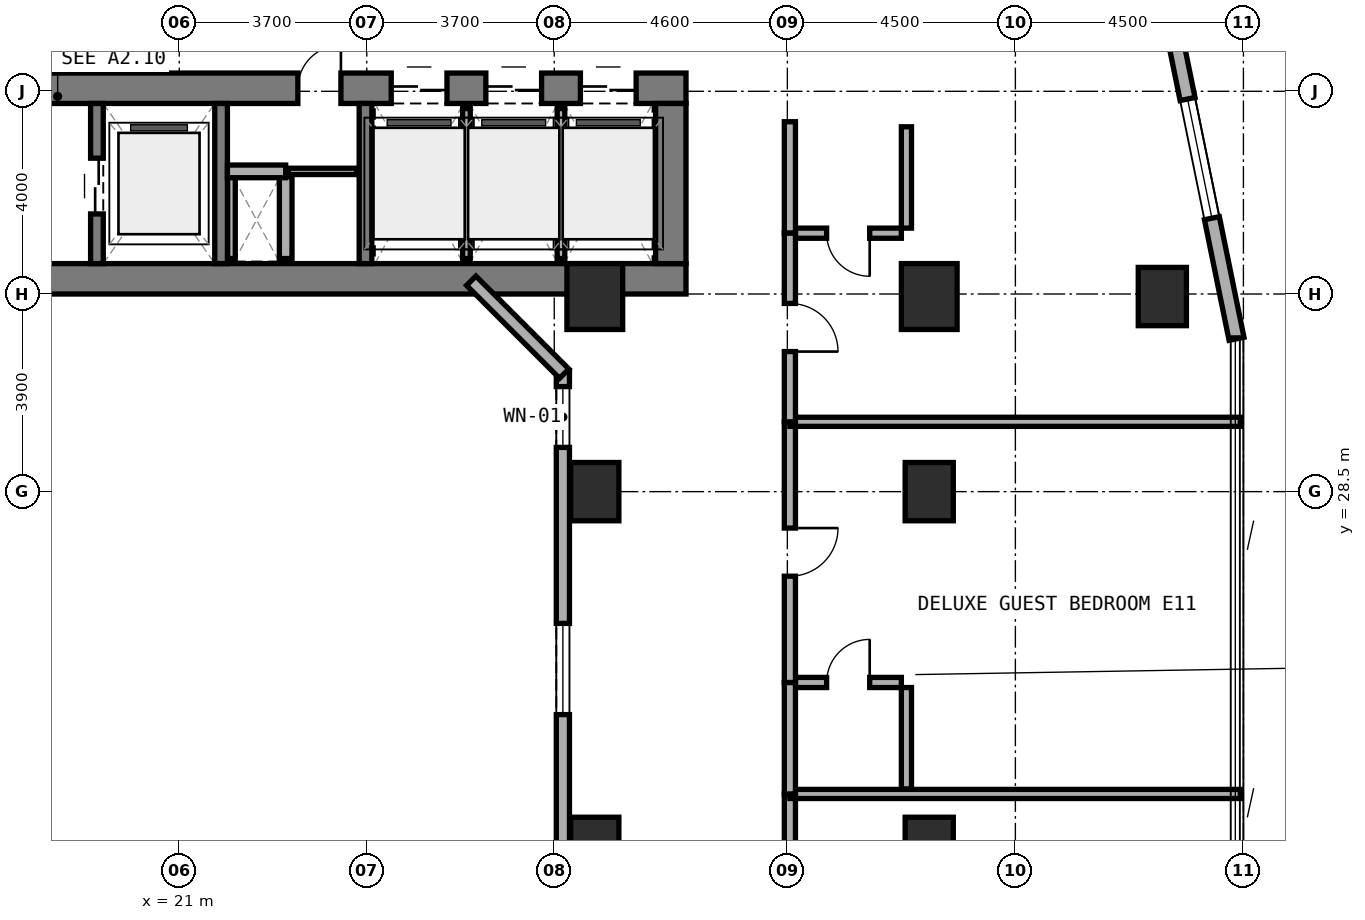
"""IFC4 building model, lengths in metres.
Left out: names, types, materials, properties, quantities, classifications, styles, units other than length and angle.
Written with IfcOpenShell. Run it as: python <this file> out.ifc"""

import sys

from ifc_helpers import new_model, si_unit, direction, frame, frame_2d, origin, origin_2d, place, context, subcontext, project, spatial, rectangle, extrude, element, fill, save


model = new_model("IFC4")
c1 = context("Model", 3, precision=1e-05, world=origin(), true_north=direction((0.0, 1.0)))
c2 = subcontext(c1, "Body", "Model", "MODEL_VIEW")
j1 = project(units=[si_unit("LENGTHUNIT", "METRE"), si_unit("PLANEANGLEUNIT", "RADIAN")], contexts=[c1])
p1 = place(None, origin())
s1 = spatial("IfcSite", under=j1, at=p1, CompositionType="ELEMENT")
p2 = place(p1, origin())
s2 = spatial("IfcBuilding", under=s1, at=p2, CompositionType="ELEMENT")
p3 = place(p2, frame((0.0, 0.0, 31.0)))
s3 = spatial("IfcBuildingStorey", under=s2, at=p3, CompositionType="ELEMENT", Elevation=31.0)
p4 = place(p3, frame((6.2, 32.7, 0.0), z_axis=(0.0, 0.0, 1.0), x_axis=(1.0, 0.0, 0.0)))
e1 = element("IfcWall", 1, at=p4, inside=s3, PredefinedType="SHEAR", context=c2, shape_type="SweptSolid", body=[
    extrude(rectangle(XDim=24.8, YDim=0.6, at=frame_2d((12.4, 0.0))), origin(), (0.0, 0.0, 1.0), 3.5),
])
p5 = place(p4, frame((6.25, 0.0, 0.0)))
e2 = element("IfcOpeningElement", 2, at=p5, cuts=e1, PredefinedType="OPENING", context=c2, shape_type="SweptSolid", body=[
    extrude(rectangle(XDim=1.1, YDim=2.15, at=frame_2d((0.55, 1.075))), frame((0.0, 0.31, 0.0), z_axis=(0.0, -1.0, 0.0), x_axis=(1.0, 0.0, 0.0)), (0.0, 0.0, 1.0), 0.62),
])
p6 = place(p3, frame((6.2, 36.46, 0.0), z_axis=(0.0, 0.0, 1.0), x_axis=(1.0, 0.0, 0.0)))
e3 = element("IfcWall", 3, at=p6, inside=s3, PredefinedType="SHEAR", context=c2, shape_type="SweptSolid", body=[
    extrude(rectangle(XDim=24.8, YDim=0.6, at=frame_2d((12.4, 0.0))), origin(), (0.0, 0.0, 1.0), 3.5),
])
p7 = place(p6, frame((9.35, 0.0, 0.0)))
e4 = element("IfcOpeningElement", 4, at=p7, cuts=e3, PredefinedType="OPENING", context=c2, shape_type="SweptSolid", body=[
    extrude(rectangle(XDim=1.2, YDim=2.15, at=frame_2d((0.6, 1.075))), frame((0.0, 0.31, 0.0), z_axis=(0.0, -1.0, 0.0), x_axis=(1.0, 0.0, 0.0)), (0.0, 0.0, 1.0), 0.62),
])
p8 = place(p6, frame((17.14, 0.0, 0.0)))
e5 = element("IfcOpeningElement", 5, at=p8, cuts=e3, PredefinedType="OPENING", context=c2, shape_type="SweptSolid", body=[
    extrude(rectangle(XDim=0.85, YDim=2.1, at=frame_2d((0.425, 1.05))), frame((0.0, 0.31, 0.0), z_axis=(0.0, -1.0, 0.0), x_axis=(1.0, 0.0, 0.0)), (0.0, 0.0, 1.0), 0.62),
])
p9 = place(p6, frame((18.983, 0.0, 0.0)))
e6 = element("IfcOpeningElement", 6, at=p9, cuts=e3, PredefinedType="OPENING", context=c2, shape_type="SweptSolid", body=[
    extrude(rectangle(XDim=1.1, YDim=2.15, at=frame_2d((0.55, 1.075))), frame((0.0, 0.31, 0.0), z_axis=(0.0, -1.0, 0.0), x_axis=(1.0, 0.0, 0.0)), (0.0, 0.0, 1.0), 0.62),
])
p10 = place(p6, frame((20.85, 0.0, 0.0)))
e7 = element("IfcOpeningElement", 7, at=p10, cuts=e3, PredefinedType="OPENING", context=c2, shape_type="SweptSolid", body=[
    extrude(rectangle(XDim=1.1, YDim=2.15, at=frame_2d((0.55, 1.075))), frame((0.0, 0.31, 0.0), z_axis=(0.0, -1.0, 0.0), x_axis=(1.0, 0.0, 0.0)), (0.0, 0.0, 1.0), 0.62),
])
p11 = place(p6, frame((22.716, 0.0, 0.0)))
e8 = element("IfcOpeningElement", 8, at=p11, cuts=e3, PredefinedType="OPENING", context=c2, shape_type="SweptSolid", body=[
    extrude(rectangle(XDim=1.1, YDim=2.15, at=frame_2d((0.55, 1.075))), frame((0.0, 0.31, 0.0), z_axis=(0.0, -1.0, 0.0), x_axis=(1.0, 0.0, 0.0)), (0.0, 0.0, 1.0), 0.62),
])
p12 = place(p3, frame((30.7, 33.0, 0.0), z_axis=(0.0, 0.0, 1.0), x_axis=(0.0, 1.0, 0.0)))
e9 = element("IfcWall", 9, at=p12, inside=s3, PredefinedType="SHEAR", context=c2, shape_type="SweptSolid", body=[
    extrude(rectangle(XDim=3.16, YDim=0.6, at=frame_2d((1.58, 0.0))), origin(), (0.0, 0.0, 1.0), 3.5),
])
p13 = place(p3, frame((19.375, 33.0, 0.0), z_axis=(0.0, 0.0, 1.0), x_axis=(0.0, 1.0, 0.0)))
e10 = element("IfcWall", 10, at=p13, inside=s3, PredefinedType="STANDARD", context=c2, shape_type="SweptSolid", body=[
    extrude(rectangle(XDim=3.16, YDim=0.25, at=frame_2d((1.58, 0.0))), origin(), (0.0, 0.0, 1.0), 3.22),
])
p14 = place(p13, frame((0.98, 0.0, 0.0)))
e11 = element("IfcOpeningElement", 11, at=p14, cuts=e10, PredefinedType="OPENING", context=c2, shape_type="SweptSolid", body=[
    extrude(rectangle(XDim=1.1, YDim=2.15, at=frame_2d((0.55, 1.075))), frame((0.0, 0.135, 0.0), z_axis=(0.0, -1.0, 0.0), x_axis=(1.0, 0.0, 0.0)), (0.0, 0.0, 1.0), 0.27),
])
for number, where, z_axis, x_axis in (
    (12, (21.825, 33.0, 0.0), (0.0, 0.0, 1.0), (0.0, 1.0, 0.0)),
    (13, (24.675, 33.0, 0.0), (0.0, 0.0, 1.0), (0.0, 1.0, 0.0)),
):
    element("IfcWall", number, at=place(p3, frame(where, z_axis=z_axis, x_axis=x_axis)), inside=s3, PredefinedType="STANDARD", context=c2, shape_type="SweptSolid", body=[
        extrude(rectangle(XDim=3.16, YDim=0.25, at=frame_2d((1.58, 0.0))), origin(), (0.0, 0.0, 1.0), 3.22),
    ])
for number, where, z_axis, x_axis in (
    (14, (35.8, 21.5, 0.0), (0.0, 0.0, 1.0), (1.0, 0.0, 0.0)),
    (15, (35.8, 28.5, 0.0), (0.0, 0.0, 1.0), (1.0, 0.0, 0.0)),
):
    element("IfcColumn", number, at=place(p3, frame(where, z_axis=z_axis, x_axis=x_axis)), inside=s3, PredefinedType="COLUMN", context=c2, shape_type="SweptSolid", body=[
        extrude(rectangle(XDim=0.95, YDim=1.15, at=origin_2d()), origin(), (0.0, 0.0, 1.0), 3.5),
    ])
for number, where, z_axis, x_axis in (
    (16, (35.8, 32.35, 0.0), (0.0, 0.0, 1.0), (1.0, 0.0, 0.0)),
    (17, (29.2, 32.35, 0.0), (0.0, 0.0, 1.0), (1.0, 0.0, 0.0)),
):
    element("IfcColumn", number, at=place(p3, frame(where, z_axis=z_axis, x_axis=x_axis)), inside=s3, PredefinedType="COLUMN", context=c2, shape_type="SweptSolid", body=[
        extrude(rectangle(XDim=1.1, YDim=1.3, at=origin_2d()), origin(), (0.0, 0.0, 1.0), 3.5),
    ])
for number, where, z_axis, x_axis in (
    (18, (29.2, 21.5, 0.0), (0.0, 0.0, 1.0), (1.0, 0.0, 0.0)),
    (19, (29.2, 28.5, 0.0), (0.0, 0.0, 1.0), (1.0, 0.0, 0.0)),
    (20, (40.4, 32.35, 0.0), (0.0, 0.0, 1.0), (1.0, 0.0, 0.0)),
):
    element("IfcColumn", number, at=place(p3, frame(where, z_axis=z_axis, x_axis=x_axis)), inside=s3, PredefinedType="COLUMN", context=c2, shape_type="SweptSolid", body=[
        extrude(rectangle(XDim=0.95, YDim=1.15, at=origin_2d()), origin(), (0.0, 0.0, 1.0), 3.5),
    ])
p15 = place(p3, frame((41.864, 31.516, 0.0), z_axis=(0.0, 0.0, 1.0), x_axis=(-0.199990901713, 0.979797754249, 0.0)))
e21 = element("IfcWall", 21, at=p15, inside=s3, PredefinedType="STANDARD", context=c2, shape_type="SweptSolid", body=[
    extrude(rectangle(XDim=10.065, YDim=0.3, at=frame_2d((5.033, 0.0))), origin(), (0.0, 0.0, 1.0), 3.22),
])
p16 = place(p15, frame((2.429, 0.0, 0.8)))
e22 = element("IfcOpeningElement", 22, at=p16, cuts=e21, PredefinedType="OPENING", context=c2, shape_type="SweptSolid", body=[
    extrude(rectangle(XDim=2.4, YDim=1.6, at=frame_2d((1.2, 0.8))), frame((0.0, 0.16, 0.0), z_axis=(0.0, -1.0, 0.0), x_axis=(1.0, 0.0, 0.0)), (0.0, 0.0, 1.0), 0.32),
])
p17 = place(p15, frame((7.887, 0.0, 0.85)))
e23 = element("IfcOpeningElement", 23, at=p17, cuts=e21, PredefinedType="OPENING", context=c2, shape_type="SweptSolid", body=[
    extrude(rectangle(XDim=1.8, YDim=1.5, at=frame_2d((0.9, 0.75))), frame((0.0, 0.16, 0.0), z_axis=(0.0, -1.0, 0.0), x_axis=(1.0, 0.0, 0.0)), (0.0, 0.0, 1.0), 0.32),
])
p18 = place(p3, frame((28.57, 19.11, 0.0), z_axis=(0.0, 0.0, 1.0), x_axis=(0.0, 1.0, 0.0)))
e24 = element("IfcWall", 24, at=p18, inside=s3, PredefinedType="STANDARD", context=c2, shape_type="SweptSolid", body=[
    extrude(rectangle(XDim=11.78, YDim=0.26, at=frame_2d((5.89, 0.0))), origin(), (0.0, 0.0, 1.0), 3.22),
])
p19 = place(p18, frame((0.318, 0.0, 0.85)))
e25 = element("IfcOpeningElement", 25, at=p19, cuts=e24, PredefinedType="OPENING", context=c2, shape_type="SweptSolid", body=[
    extrude(rectangle(XDim=1.2, YDim=1.5, at=frame_2d((0.6, 0.75))), frame((0.0, 0.14, 0.0), z_axis=(0.0, -1.0, 0.0), x_axis=(1.0, 0.0, 0.0)), (0.0, 0.0, 1.0), 0.28),
])
p20 = place(p18, frame((4.99, 0.0, 0.85)))
e26 = element("IfcOpeningElement", 26, at=p20, cuts=e24, PredefinedType="OPENING", context=c2, shape_type="SweptSolid", body=[
    extrude(rectangle(XDim=1.8, YDim=1.5, at=frame_2d((0.9, 0.75))), frame((0.0, 0.14, 0.0), z_axis=(0.0, -1.0, 0.0), x_axis=(1.0, 0.0, 0.0)), (0.0, 0.0, 1.0), 0.28),
])
p21 = place(p18, frame((10.263, 0.0, 0.85)))
e27 = element("IfcOpeningElement", 27, at=p21, cuts=e24, PredefinedType="OPENING", context=c2, shape_type="SweptSolid", body=[
    extrude(rectangle(XDim=1.2, YDim=1.5, at=frame_2d((0.6, 0.75))), frame((0.0, 0.14, 0.0), z_axis=(0.0, -1.0, 0.0), x_axis=(1.0, 0.0, 0.0)), (0.0, 0.0, 1.0), 0.28),
])
p22 = place(p3, frame((28.596, 30.828, 0.0), z_axis=(0.0, 0.0, 1.0), x_axis=(-0.707059717605, 0.707153841636, 0.0)))
e28 = element("IfcWall", 28, at=p22, inside=s3, PredefinedType="STANDARD", context=c2, shape_type="SweptSolid", body=[
    extrude(rectangle(XDim=2.594, YDim=0.26, at=frame_2d((1.297, 0.0))), origin(), (0.0, 0.0, 1.0), 3.22),
])
p23 = place(p3, frame((22.03, 33.1, 0.0), z_axis=(0.0, 0.0, 1.0), x_axis=(0.0, 1.0, 0.0)))
e29 = element("IfcWall", 29, at=p23, inside=s3, PredefinedType="PARTITIONING", context=c2, shape_type="SweptSolid", body=[
    extrude(rectangle(XDim=1.62, YDim=0.15, at=frame_2d((0.81, 0.0))), origin(), (0.0, 0.0, 1.0), 3.22),
])
p24 = place(p3, frame((23.1, 33.1, 0.0), z_axis=(0.0, 0.0, 1.0), x_axis=(0.0, 1.0, 0.0)))
e30 = element("IfcWall", 30, at=p24, inside=s3, PredefinedType="SOLIDWALL", context=c2, shape_type="SweptSolid", body=[
    extrude(rectangle(XDim=1.62, YDim=0.25, at=frame_2d((0.81, 0.0))), origin(), (0.0, 0.0, 1.0), 3.22),
])
p25 = place(p3, frame((21.95, 34.82, 0.0), z_axis=(0.0, 0.0, 1.0), x_axis=(1.0, 0.0, 0.0)))
e31 = element("IfcWall", 31, at=p25, inside=s3, PredefinedType="SOLIDWALL", context=c2, shape_type="SweptSolid", body=[
    extrude(rectangle(XDim=1.15, YDim=0.25, at=frame_2d((0.575, 0.0))), origin(), (0.0, 0.0, 1.0), 3.22),
])
p26 = place(p3, frame((23.15, 34.82, 0.0), z_axis=(0.0, 0.0, 1.0), x_axis=(1.0, 0.0, 0.0)))
e32 = element("IfcWall", 32, at=p26, inside=s3, PredefinedType="PARTITIONING", context=c2, shape_type="SweptSolid", body=[
    extrude(rectangle(XDim=1.35, YDim=0.125, at=frame_2d((0.675, 0.0))), origin(), (0.0, 0.0, 1.0), 3.22),
])
p27 = place(p3, frame((26.667, 33.1, 0.0), z_axis=(0.0, 0.0, 1.0), x_axis=(0.0, 1.0, 0.0)))
e33 = element("IfcWall", 33, at=p27, inside=s3, PredefinedType="PARTITIONING", context=c2, shape_type="SweptSolid", body=[
    extrude(rectangle(XDim=2.96, YDim=0.15, at=frame_2d((1.48, 0.0))), origin(), (0.0, 0.0, 1.0), 3.22),
])
p28 = place(p3, frame((28.533, 33.1, 0.0), z_axis=(0.0, 0.0, 1.0), x_axis=(0.0, 1.0, 0.0)))
e34 = element("IfcWall", 34, at=p28, inside=s3, PredefinedType="PARTITIONING", context=c2, shape_type="SweptSolid", body=[
    extrude(rectangle(XDim=2.96, YDim=0.15, at=frame_2d((1.48, 0.0))), origin(), (0.0, 0.0, 1.0), 2.395),
])
p29 = place(p3, frame((33.05, 16.4, 0.0), z_axis=(0.0, 0.0, 1.0), x_axis=(0.0, 1.0, 0.0)))
e35 = element("IfcWall", 35, at=p29, inside=s3, PredefinedType="SOLIDWALL", context=c2, shape_type="SweptSolid", body=[
    extrude(rectangle(XDim=6.134, YDim=0.22, at=frame_2d((3.067, 0.0))), origin(), (0.0, 0.0, 1.0), 2.395),
])
p30 = place(p29, frame((2.592, 0.0, 0.0)))
e36 = element("IfcOpeningElement", 36, at=p30, cuts=e35, PredefinedType="OPENING", context=c2, shape_type="SweptSolid", body=[
    extrude(rectangle(XDim=0.95, YDim=2.1, at=frame_2d((0.475, 1.05))), frame((0.0, 0.12, 0.0), z_axis=(0.0, -1.0, 0.0), x_axis=(1.0, 0.0, 0.0)), (0.0, 0.0, 1.0), 0.24),
])
p31 = place(p3, frame((33.05, 22.534, 0.0), z_axis=(0.0, 0.0, 1.0), x_axis=(1.0, 0.0, 0.0)))
e37 = element("IfcWall", 37, at=p31, inside=s3, PredefinedType="SOLIDWALL", context=c2, shape_type="SweptSolid", body=[
    extrude(rectangle(XDim=8.89, YDim=0.18, at=frame_2d((4.445, 0.0))), origin(), (0.0, 0.0, 1.0), 2.745),
])
p32 = place(p3, frame((33.15, 24.734, 0.0), z_axis=(0.0, 0.0, 1.0), x_axis=(1.0, 0.0, 0.0)))
e38 = element("IfcWall", 38, at=p32, inside=s3, PredefinedType="PLUMBINGWALL", context=c2, shape_type="SweptSolid", body=[
    extrude(rectangle(XDim=2.1, YDim=0.2, at=frame_2d((1.05, 0.0))), origin(), (0.0, 0.0, 1.0), 3.22),
])
p33 = place(p32, frame((0.625, 0.0, 0.0)))
e39 = element("IfcOpeningElement", 39, at=p33, cuts=e38, PredefinedType="OPENING", context=c2, shape_type="SweptSolid", body=[
    extrude(rectangle(XDim=0.85, YDim=2.1, at=frame_2d((0.425, 1.05))), frame((0.0, 0.11, 0.0), z_axis=(0.0, -1.0, 0.0), x_axis=(1.0, 0.0, 0.0)), (0.0, 0.0, 1.0), 0.22),
])
p34 = place(p3, frame((35.35, 22.634, 0.0), z_axis=(0.0, 0.0, 1.0), x_axis=(0.0, 1.0, 0.0)))
e40 = element("IfcWall", 40, at=p34, inside=s3, PredefinedType="PLUMBINGWALL", context=c2, shape_type="SweptSolid", body=[
    extrude(rectangle(XDim=2.0, YDim=0.2, at=frame_2d((1.0, 0.0))), origin(), (0.0, 0.0, 1.0), 3.22),
])
p35 = place(p3, frame((33.05, 22.534, 0.0), z_axis=(0.0, 0.0, 1.0), x_axis=(0.0, 1.0, 0.0)))
e41 = element("IfcWall", 41, at=p35, inside=s3, PredefinedType="SOLIDWALL", context=c2, shape_type="SweptSolid", body=[
    extrude(rectangle(XDim=2.2, YDim=0.22, at=frame_2d((1.1, 0.0))), origin(), (0.0, 0.0, 1.0), 3.22),
])
p36 = place(p3, frame((33.05, 24.734, 0.0), z_axis=(0.0, 0.0, 1.0), x_axis=(0.0, 1.0, 0.0)))
e42 = element("IfcWall", 42, at=p36, inside=s3, PredefinedType="SOLIDWALL", context=c2, shape_type="SweptSolid", body=[
    extrude(rectangle(XDim=5.144, YDim=0.22, at=frame_2d((2.572, 0.0))), origin(), (0.0, 0.0, 1.0), 2.395),
])
p37 = place(p36, frame((2.097, 0.0, 0.0)))
e43 = element("IfcOpeningElement", 43, at=p37, cuts=e42, PredefinedType="OPENING", context=c2, shape_type="SweptSolid", body=[
    extrude(rectangle(XDim=0.95, YDim=2.1, at=frame_2d((0.475, 1.05))), frame((0.0, 0.12, 0.0), z_axis=(0.0, -1.0, 0.0), x_axis=(1.0, 0.0, 0.0)), (0.0, 0.0, 1.0), 0.24),
])
p38 = place(p3, frame((33.05, 29.878, 0.0), z_axis=(0.0, 0.0, 1.0), x_axis=(1.0, 0.0, 0.0)))
e44 = element("IfcWall", 44, at=p38, inside=s3, PredefinedType="SOLIDWALL", context=c2, shape_type="SweptSolid", body=[
    extrude(rectangle(XDim=8.89, YDim=0.18, at=frame_2d((4.445, 0.0))), origin(), (0.0, 0.0, 1.0), 2.745),
])
p39 = place(p3, frame((33.15, 33.6, 0.0), z_axis=(0.0, 0.0, 1.0), x_axis=(1.0, 0.0, 0.0)))
e45 = element("IfcWall", 45, at=p39, inside=s3, PredefinedType="PLUMBINGWALL", context=c2, shape_type="SweptSolid", body=[
    extrude(rectangle(XDim=2.1, YDim=0.2, at=frame_2d((1.05, 0.0))), origin(), (0.0, 0.0, 1.0), 3.22),
])
p40 = place(p39, frame((0.625, 0.0, 0.0)))
e46 = element("IfcOpeningElement", 46, at=p40, cuts=e45, PredefinedType="OPENING", context=c2, shape_type="SweptSolid", body=[
    extrude(rectangle(XDim=0.85, YDim=2.1, at=frame_2d((0.425, 1.05))), frame((0.0, 0.11, 0.0), z_axis=(0.0, -1.0, 0.0), x_axis=(1.0, 0.0, 0.0)), (0.0, 0.0, 1.0), 0.22),
])
p41 = place(p3, frame((35.35, 33.7, 0.0), z_axis=(0.0, 0.0, 1.0), x_axis=(0.0, 1.0, 0.0)))
e47 = element("IfcWall", 47, at=p41, inside=s3, PredefinedType="PLUMBINGWALL", context=c2, shape_type="SweptSolid", body=[
    extrude(rectangle(XDim=2.0, YDim=0.2, at=frame_2d((1.0, 0.0))), origin(), (0.0, 0.0, 1.0), 2.745),
])
p42 = place(p3, frame((33.05, 33.6, 0.0), z_axis=(0.0, 0.0, 1.0), x_axis=(0.0, 1.0, 0.0)))
e48 = element("IfcWall", 48, at=p42, inside=s3, PredefinedType="SOLIDWALL", context=c2, shape_type="SweptSolid", body=[
    extrude(rectangle(XDim=2.2, YDim=0.22, at=frame_2d((1.1, 0.0))), origin(), (0.0, 0.0, 1.0), 3.22),
])
p43 = place(p3, frame((33.05, 29.878, 0.0), z_axis=(0.0, 0.0, 1.0), x_axis=(0.0, 1.0, 0.0)))
e49 = element("IfcWall", 49, at=p43, inside=s3, PredefinedType="SOLIDWALL", context=c2, shape_type="SweptSolid", body=[
    extrude(rectangle(XDim=3.722, YDim=0.22, at=frame_2d((1.861, 0.0))), origin(), (0.0, 0.0, 1.0), 2.395),
])
p44 = place(p43, frame((1.386, 0.0, 0.0)))
e50 = element("IfcOpeningElement", 50, at=p44, cuts=e49, PredefinedType="OPENING", context=c2, shape_type="SweptSolid", body=[
    extrude(rectangle(XDim=0.95, YDim=2.1, at=frame_2d((0.475, 1.05))), frame((0.0, 0.12, 0.0), z_axis=(0.0, -1.0, 0.0), x_axis=(1.0, 0.0, 0.0)), (0.0, 0.0, 1.0), 0.24),
])
p45 = place(p16, origin())
e51 = element("IfcWindow", 51, at=p45, inside=s3, PartitioningType="SINGLE_PANEL", PredefinedType="WINDOW", context=c2, shape_type="SweptSolid", body=[
    extrude(rectangle(XDim=2.4, YDim=1.6, at=frame_2d((1.2, 0.8))), frame((0.0, 0.03, 0.0), z_axis=(0.0, -1.0, 0.0), x_axis=(1.0, 0.0, 0.0)), (0.0, 0.0, 1.0), 0.06),
])
fill(e22, e51)
p46 = place(p20, origin())
e52 = element("IfcWindow", 52, at=p46, inside=s3, PartitioningType="SINGLE_PANEL", PredefinedType="WINDOW", context=c2, shape_type="SweptSolid", body=[
    extrude(rectangle(XDim=1.8, YDim=1.5, at=frame_2d((0.9, 0.75))), frame((0.0, 0.03, 0.0), z_axis=(0.0, -1.0, 0.0), x_axis=(1.0, 0.0, 0.0)), (0.0, 0.0, 1.0), 0.06),
])
fill(e26, e52)
p47 = place(p21, origin())
e53 = element("IfcWindow", 53, at=p47, inside=s3, PartitioningType="SINGLE_PANEL", PredefinedType="WINDOW", context=c2, shape_type="SweptSolid", body=[
    extrude(rectangle(XDim=1.2, YDim=1.5, at=frame_2d((0.6, 0.75))), frame((0.0, 0.03, 0.0), z_axis=(0.0, -1.0, 0.0), x_axis=(1.0, 0.0, 0.0)), (0.0, 0.0, 1.0), 0.06),
])
fill(e27, e53)
p48 = place(p14, origin())
e54 = element("IfcDoor", 54, at=p48, inside=s3, OperationType="DOUBLE_DOOR_SLIDING", PredefinedType="DOOR", context=c2, shape_type="SweptSolid", body=[
    extrude(rectangle(XDim=1.1, YDim=2.15, at=frame_2d((0.55, 1.075))), frame((0.0, 0.025, 0.0), z_axis=(0.0, -1.0, 0.0), x_axis=(1.0, 0.0, 0.0)), (0.0, 0.0, 1.0), 0.05),
])
fill(e11, e54)
p49 = place(p8, origin())
e55 = element("IfcDoor", 55, at=p49, inside=s3, OperationType="SINGLE_SWING_RIGHT", PredefinedType="DOOR", context=c2, shape_type="SweptSolid", body=[
    extrude(rectangle(XDim=0.85, YDim=2.1, at=frame_2d((0.425, 1.05))), frame((0.0, 0.025, 0.0), z_axis=(0.0, -1.0, 0.0), x_axis=(1.0, 0.0, 0.0)), (0.0, 0.0, 1.0), 0.05),
])
fill(e5, e55)
p50 = place(p9, origin())
e56 = element("IfcDoor", 56, at=p50, inside=s3, OperationType="DOUBLE_DOOR_SLIDING", PredefinedType="DOOR", context=c2, shape_type="SweptSolid", body=[
    extrude(rectangle(XDim=1.1, YDim=2.15, at=frame_2d((0.55, 1.075))), frame((0.0, 0.025, 0.0), z_axis=(0.0, -1.0, 0.0), x_axis=(1.0, 0.0, 0.0)), (0.0, 0.0, 1.0), 0.05),
])
fill(e6, e56)
p51 = place(p10, origin())
e57 = element("IfcDoor", 57, at=p51, inside=s3, OperationType="DOUBLE_DOOR_SLIDING", PredefinedType="DOOR", context=c2, shape_type="SweptSolid", body=[
    extrude(rectangle(XDim=1.1, YDim=2.15, at=frame_2d((0.55, 1.075))), frame((0.0, 0.025, 0.0), z_axis=(0.0, -1.0, 0.0), x_axis=(1.0, 0.0, 0.0)), (0.0, 0.0, 1.0), 0.05),
])
fill(e7, e57)
p52 = place(p11, origin())
e58 = element("IfcDoor", 58, at=p52, inside=s3, OperationType="DOUBLE_DOOR_SLIDING", PredefinedType="DOOR", context=c2, shape_type="SweptSolid", body=[
    extrude(rectangle(XDim=1.1, YDim=2.15, at=frame_2d((0.55, 1.075))), frame((0.0, 0.025, 0.0), z_axis=(0.0, -1.0, 0.0), x_axis=(1.0, 0.0, 0.0)), (0.0, 0.0, 1.0), 0.05),
])
fill(e8, e58)
p53 = place(p33, origin())
e59 = element("IfcDoor", 59, at=p53, inside=s3, OperationType="SINGLE_SWING_RIGHT", PredefinedType="DOOR", context=c2, shape_type="SweptSolid", body=[
    extrude(rectangle(XDim=0.85, YDim=2.1, at=frame_2d((0.425, 1.05))), frame((0.0, 0.025, 0.0), z_axis=(0.0, -1.0, 0.0), x_axis=(1.0, 0.0, 0.0)), (0.0, 0.0, 1.0), 0.05),
])
fill(e39, e59)
p54 = place(p37, frame((0.95, 0.0, 0.0), z_axis=(0.0, 0.0, 1.0), x_axis=(-1.0, 0.0, 0.0)))
e60 = element("IfcDoor", 60, at=p54, inside=s3, OperationType="SINGLE_SWING_LEFT", PredefinedType="DOOR", context=c2, shape_type="SweptSolid", body=[
    extrude(rectangle(XDim=0.95, YDim=2.1, at=frame_2d((0.475, 1.05))), frame((0.0, 0.025, 0.0), z_axis=(0.0, -1.0, 0.0), x_axis=(1.0, 0.0, 0.0)), (0.0, 0.0, 1.0), 0.05),
])
fill(e43, e60)
p55 = place(p40, frame((0.85, 0.0, 0.0), z_axis=(0.0, 0.0, 1.0), x_axis=(-1.0, 0.0, 0.0)))
e61 = element("IfcDoor", 61, at=p55, inside=s3, OperationType="SINGLE_SWING_LEFT", PredefinedType="DOOR", context=c2, shape_type="SweptSolid", body=[
    extrude(rectangle(XDim=0.85, YDim=2.1, at=frame_2d((0.425, 1.05))), frame((0.0, 0.025, 0.0), z_axis=(0.0, -1.0, 0.0), x_axis=(1.0, 0.0, 0.0)), (0.0, 0.0, 1.0), 0.05),
])
fill(e46, e61)
p56 = place(p44, frame((0.95, 0.0, 0.0), z_axis=(0.0, 0.0, 1.0), x_axis=(-1.0, 0.0, 0.0)))
e62 = element("IfcDoor", 62, at=p56, inside=s3, OperationType="SINGLE_SWING_RIGHT", PredefinedType="DOOR", context=c2, shape_type="SweptSolid", body=[
    extrude(rectangle(XDim=0.95, YDim=2.1, at=frame_2d((0.475, 1.05))), frame((0.0, 0.025, 0.0), z_axis=(0.0, -1.0, 0.0), x_axis=(1.0, 0.0, 0.0)), (0.0, 0.0, 1.0), 0.05),
])
fill(e50, e62)
save(model, sys.argv[1])
